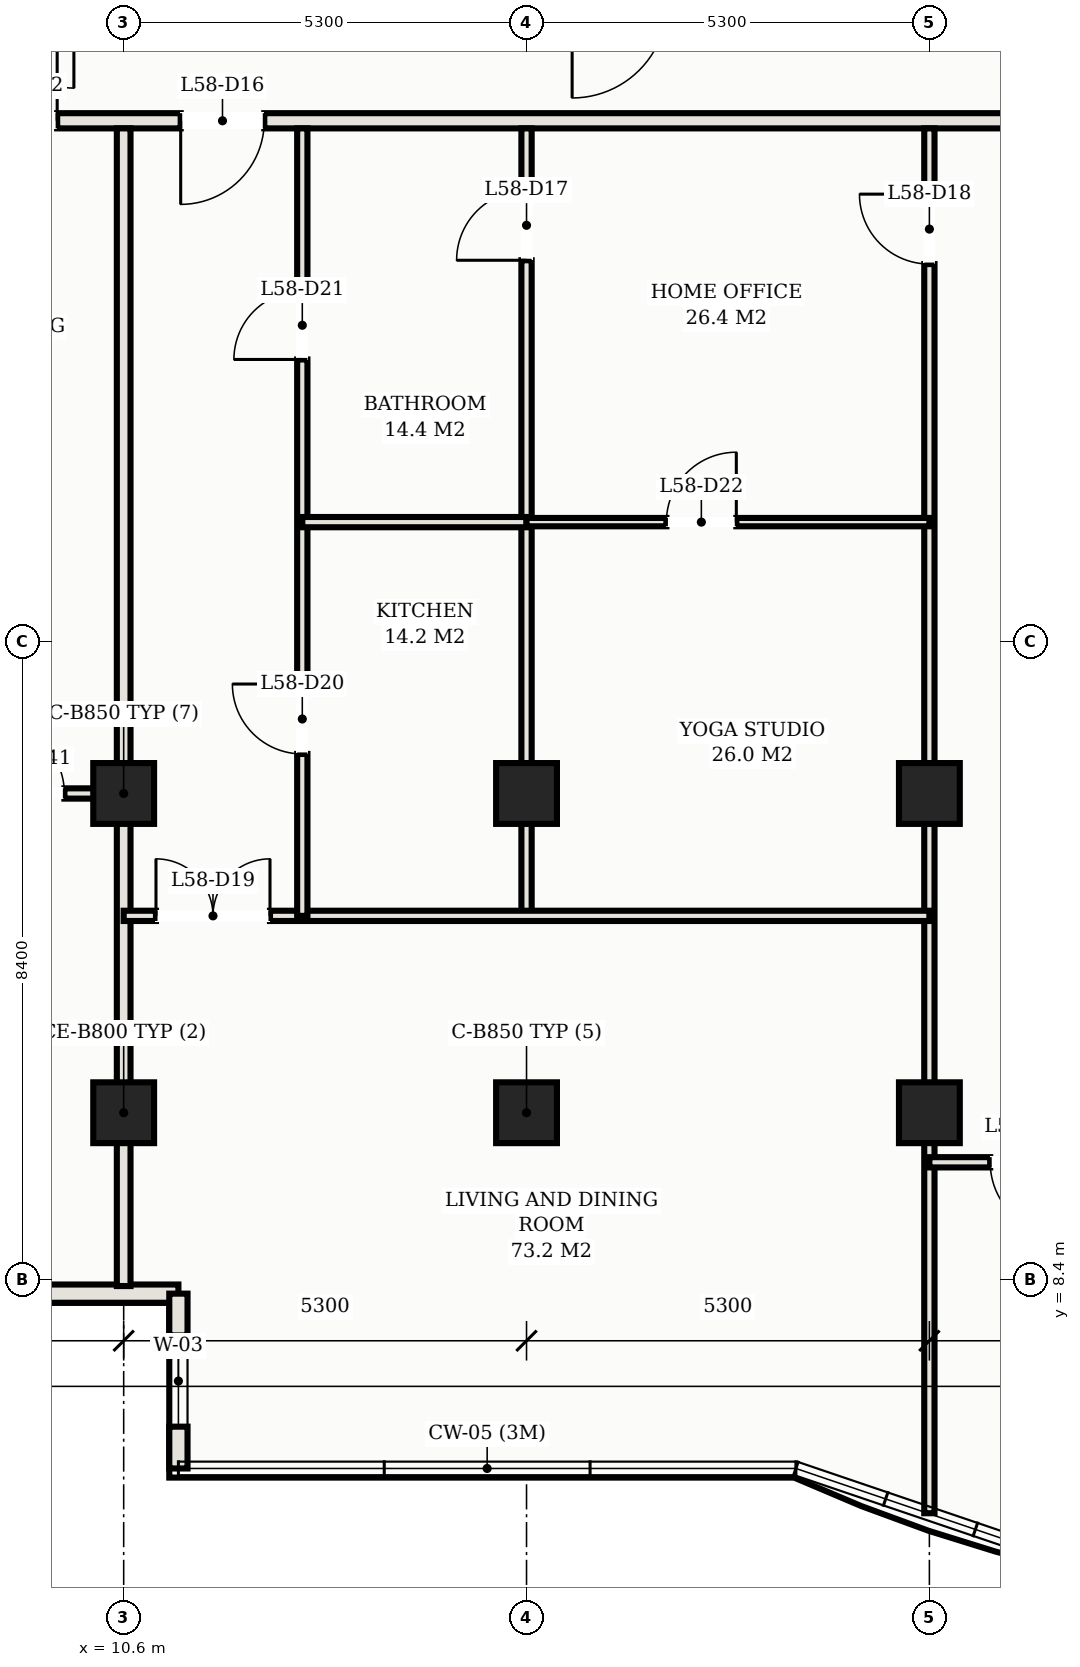
"""IFC4 building model, lengths in metres.
Left out: names, types, materials, properties, quantities, classifications, styles, units other than length and angle.
Written with IfcOpenShell. Run it as: python <this file> out.ifc"""

import sys

from ifc_helpers import new_model, si_unit, direction, frame, frame_2d, origin, origin_2d, place, context, subcontext, project, spatial, rectangle, hollow_rectangle, extrude, element, fill, save


model = new_model("IFC4")
c1 = context("Model", 3, precision=1e-05, world=origin(), true_north=direction((0.0, 1.0)))
c2 = subcontext(c1, "Body", "Model", "MODEL_VIEW")
j1 = project(units=[si_unit("LENGTHUNIT", "METRE"), si_unit("PLANEANGLEUNIT", "RADIAN")], contexts=[c1])
p1 = place(None, origin())
s1 = spatial("IfcSite", under=j1, at=p1, CompositionType="ELEMENT")
p2 = place(p1, origin())
s2 = spatial("IfcBuilding", under=s1, at=p2, CompositionType="ELEMENT")
p3 = place(p2, frame((0.0, 0.0, 213.2)))
s3 = spatial("IfcBuildingStorey", under=s2, at=p3, CompositionType="ELEMENT", Elevation=213.2)
for number, where, z_axis, x_axis in (
    (1, (10.6, 14.8, 0.0), (0.0, 0.0, 1.0), (1.0, 0.0, 0.0)),
    (2, (10.6, 10.6, 0.0), (0.0, 0.0, 1.0), (1.0, 0.0, 0.0)),
    (3, (15.9, 14.8, 0.0), (0.0, 0.0, 1.0), (1.0, 0.0, 0.0)),
    (4, (15.9, 10.6, 0.0), (0.0, 0.0, 1.0), (1.0, 0.0, 0.0)),
    (5, (21.2, 14.8, 0.0), (0.0, 0.0, 1.0), (1.0, 0.0, 0.0)),
    (6, (21.2, 10.6, 0.0), (0.0, 0.0, 1.0), (1.0, 0.0, 0.0)),
):
    element("IfcColumn", number, at=place(p3, frame(where, z_axis=z_axis, x_axis=x_axis)), inside=s3, PredefinedType="COLUMN", context=c2, shape_type="SweptSolid", body=[
        extrude(hollow_rectangle(XDim=0.8, YDim=0.8, WallThickness=0.028, at=origin_2d()), origin(), (0.0, 0.0, 1.0), 3.3),
    ])
p4 = place(p3, frame((9.02, 8.22, 0.0), z_axis=(0.0, 0.0, 1.0), x_axis=(1.0, 0.0, 0.0)))
e7 = element("IfcWall", 7, at=p4, inside=s3, PredefinedType="SOLIDWALL", context=c2, shape_type="SweptSolid", body=[
    extrude(rectangle(XDim=2.3, YDim=0.24, at=frame_2d((1.15, 0.0))), origin(), (0.0, 0.0, 1.0), 3.11),
])
p5 = place(p3, frame((11.32, 8.22, 0.0), z_axis=(0.0, 0.0, 1.0), x_axis=(0.0, -1.0, 0.0)))
e8 = element("IfcWall", 8, at=p5, inside=s3, PredefinedType="SOLIDWALL", context=c2, shape_type="SweptSolid", body=[
    extrude(rectangle(XDim=2.3, YDim=0.24, at=frame_2d((1.15, 0.0))), origin(), (0.0, 0.0, 1.0), 3.11),
])
p6 = place(p5, frame((0.55, 0.0, 0.75)))
e9 = element("IfcOpeningElement", 9, at=p6, cuts=e8, PredefinedType="OPENING", context=c2, shape_type="SweptSolid", body=[
    extrude(rectangle(XDim=1.2, YDim=1.5, at=frame_2d((0.6, 0.75))), frame((0.0, 0.13, 0.0), z_axis=(0.0, -1.0, 0.0), x_axis=(1.0, 0.0, 0.0)), (0.0, 0.0, 1.0), 0.26),
])
p7 = place(p3, frame((6.72, 23.65, 0.0), z_axis=(0.0, 0.0, 1.0), x_axis=(1.0, 0.0, 0.0)))
e10 = element("IfcWall", 10, at=p7, inside=s3, PredefinedType="PARTITIONING", context=c2, shape_type="SweptSolid", body=[
    extrude(rectangle(XDim=39.56, YDim=0.2, at=frame_2d((19.78, 0.0))), origin(), (0.0, 0.0, 1.0), 2.43),
])
p8 = place(p7, frame((4.63, 0.0, 0.0)))
e11 = element("IfcOpeningElement", 11, at=p8, cuts=e10, PredefinedType="OPENING", context=c2, shape_type="SweptSolid", body=[
    extrude(rectangle(XDim=1.1, YDim=2.25, at=frame_2d((0.55, 1.125))), frame((0.0, 0.11, 0.0), z_axis=(0.0, -1.0, 0.0), x_axis=(1.0, 0.0, 0.0)), (0.0, 0.0, 1.0), 0.22),
])
p9 = place(p7, frame((20.53, 0.0, 0.0)))
e12 = element("IfcOpeningElement", 12, at=p9, cuts=e10, PredefinedType="OPENING", context=c2, shape_type="SweptSolid", body=[
    extrude(rectangle(XDim=1.1, YDim=2.25, at=frame_2d((0.55, 1.125))), frame((0.0, 0.11, 0.0), z_axis=(0.0, -1.0, 0.0), x_axis=(1.0, 0.0, 0.0)), (0.0, 0.0, 1.0), 0.22),
])
p10 = place(p7, frame((2.085, 0.0, 0.0)))
e13 = element("IfcOpeningElement", 13, at=p10, cuts=e10, PredefinedType="OPENING", context=c2, shape_type="SweptSolid", body=[
    extrude(rectangle(XDim=0.92, YDim=2.15, at=frame_2d((0.46, 1.075))), frame((0.0, 0.11, 0.0), z_axis=(0.0, -1.0, 0.0), x_axis=(1.0, 0.0, 0.0)), (0.0, 0.0, 1.0), 0.22),
])
p11 = place(p7, frame((36.555, 0.0, 0.0)))
e14 = element("IfcOpeningElement", 14, at=p11, cuts=e10, PredefinedType="OPENING", context=c2, shape_type="SweptSolid", body=[
    extrude(rectangle(XDim=0.92, YDim=2.15, at=frame_2d((0.46, 1.075))), frame((0.0, 0.11, 0.0), z_axis=(0.0, -1.0, 0.0), x_axis=(1.0, 0.0, 0.0)), (0.0, 0.0, 1.0), 0.22),
])
p12 = place(p3, frame((10.6, 8.32, 0.0), z_axis=(0.0, 0.0, 1.0), x_axis=(0.0, 1.0, 0.0)))
e15 = element("IfcWall", 15, at=p12, inside=s3, PredefinedType="PARTITIONING", context=c2, shape_type="SweptSolid", body=[
    extrude(rectangle(XDim=15.23, YDim=0.18, at=frame_2d((7.615, 0.0))), origin(), (0.0, 0.0, 1.0), 2.43),
])
p13 = place(p3, frame((15.9, 14.8, 0.0), z_axis=(0.0, 0.0, 1.0), x_axis=(0.0, 1.0, 0.0)))
e16 = element("IfcWall", 16, at=p13, inside=s3, PredefinedType="PARTITIONING", context=c2, shape_type="SweptSolid", body=[
    extrude(rectangle(XDim=8.75, YDim=0.135, at=frame_2d((4.375, 0.0))), origin(), (0.0, 0.0, 1.0), 2.43),
])
p14 = place(p13, frame((7.015, 0.0, 0.0)))
e17 = element("IfcOpeningElement", 17, at=p14, cuts=e16, PredefinedType="OPENING", context=c2, shape_type="SweptSolid", body=[
    extrude(rectangle(XDim=0.92, YDim=2.15, at=frame_2d((0.46, 1.075))), frame((0.0, 0.078, 0.0), z_axis=(0.0, -1.0, 0.0), x_axis=(1.0, 0.0, 0.0)), (0.0, 0.0, 1.0), 0.155),
])
p15 = place(p3, frame((21.2, 5.331, 0.0), z_axis=(0.0, 0.0, 1.0), x_axis=(0.0, 1.0, 0.0)))
e18 = element("IfcWall", 18, at=p15, inside=s3, PredefinedType="PARTITIONING", context=c2, shape_type="SweptSolid", body=[
    extrude(rectangle(XDim=18.219, YDim=0.135, at=frame_2d((9.109, 0.0))), origin(), (0.0, 0.0, 1.0), 2.43),
])
p16 = place(p15, frame((16.434, 0.0, 0.0)))
e19 = element("IfcOpeningElement", 19, at=p16, cuts=e18, PredefinedType="OPENING", context=c2, shape_type="SweptSolid", body=[
    extrude(rectangle(XDim=0.92, YDim=2.15, at=frame_2d((0.46, 1.075))), frame((0.0, 0.078, 0.0), z_axis=(0.0, -1.0, 0.0), x_axis=(1.0, 0.0, 0.0)), (0.0, 0.0, 1.0), 0.155),
])
p17 = place(p3, frame((15.9, 13.19, 0.0), z_axis=(0.0, 0.0, 1.0), x_axis=(0.0, 1.0, 0.0)))
e20 = element("IfcWall", 20, at=p17, inside=s3, PredefinedType="PARTITIONING", context=c2, shape_type="SweptSolid", body=[
    extrude(rectangle(XDim=1.61, YDim=0.135, at=frame_2d((0.805, 0.0))), origin(), (0.0, 0.0, 1.0), 2.43),
])
p18 = place(p3, frame((10.6, 13.19, 0.0), z_axis=(0.0, 0.0, 1.0), x_axis=(1.0, 0.0, 0.0)))
e21 = element("IfcWall", 21, at=p18, inside=s3, PredefinedType="PARTITIONING", context=c2, shape_type="SweptSolid", body=[
    extrude(rectangle(XDim=10.6, YDim=0.135, at=frame_2d((5.3, 0.0))), origin(), (0.0, 0.0, 1.0), 2.43),
])
p19 = place(p18, frame((0.425, 0.0, 0.0)))
e22 = element("IfcOpeningElement", 22, at=p19, cuts=e21, PredefinedType="OPENING", context=c2, shape_type="SweptSolid", body=[
    extrude(rectangle(XDim=1.5, YDim=2.25, at=frame_2d((0.75, 1.125))), frame((0.0, 0.078, 0.0), z_axis=(0.0, -1.0, 0.0), x_axis=(1.0, 0.0, 0.0)), (0.0, 0.0, 1.0), 0.155),
])
p20 = place(p3, frame((12.95, 13.19, 0.0), z_axis=(0.0, 0.0, 1.0), x_axis=(0.0, 1.0, 0.0)))
e23 = element("IfcWall", 23, at=p20, inside=s3, PredefinedType="PARTITIONING", context=c2, shape_type="SweptSolid", body=[
    extrude(rectangle(XDim=10.36, YDim=0.135, at=frame_2d((5.18, 0.0))), origin(), (0.0, 0.0, 1.0), 2.43),
])
p21 = place(p20, frame((2.13, 0.0, 0.0)))
e24 = element("IfcOpeningElement", 24, at=p21, cuts=e23, PredefinedType="OPENING", context=c2, shape_type="SweptSolid", body=[
    extrude(rectangle(XDim=0.92, YDim=2.15, at=frame_2d((0.46, 1.075))), frame((0.0, 0.078, 0.0), z_axis=(0.0, -1.0, 0.0), x_axis=(1.0, 0.0, 0.0)), (0.0, 0.0, 1.0), 0.155),
])
p22 = place(p20, frame((7.32, 0.0, 0.0)))
e25 = element("IfcOpeningElement", 25, at=p22, cuts=e23, PredefinedType="OPENING", context=c2, shape_type="SweptSolid", body=[
    extrude(rectangle(XDim=0.9, YDim=2.15, at=frame_2d((0.45, 1.075))), frame((0.0, 0.078, 0.0), z_axis=(0.0, -1.0, 0.0), x_axis=(1.0, 0.0, 0.0)), (0.0, 0.0, 1.0), 0.155),
])
p23 = place(p3, frame((12.95, 18.37, 0.0), z_axis=(0.0, 0.0, 1.0), x_axis=(1.0, 0.0, 0.0)))
e26 = element("IfcWall", 26, at=p23, inside=s3, PredefinedType="PARTITIONING", context=c2, shape_type="SweptSolid", body=[
    extrude(rectangle(XDim=2.95, YDim=0.135, at=frame_2d((1.475, 0.0))), origin(), (0.0, 0.0, 1.0), 2.43),
])
p24 = place(p3, frame((15.9, 18.37, 0.0), z_axis=(0.0, 0.0, 1.0), x_axis=(1.0, 0.0, 0.0)))
e27 = element("IfcWall", 27, at=p24, inside=s3, PredefinedType="MOVABLE", context=c2, shape_type="SweptSolid", body=[
    extrude(rectangle(XDim=5.3, YDim=0.11, at=frame_2d((2.65, 0.0))), origin(), (0.0, 0.0, 1.0), 2.43),
])
p25 = place(p24, frame((1.84, 0.0, 0.0)))
e28 = element("IfcOpeningElement", 28, at=p25, cuts=e27, PredefinedType="OPENING", context=c2, shape_type="SweptSolid", body=[
    extrude(rectangle(XDim=0.92, YDim=2.15, at=frame_2d((0.46, 1.075))), frame((0.0, 0.065, 0.0), z_axis=(0.0, -1.0, 0.0), x_axis=(1.0, 0.0, 0.0)), (0.0, 0.0, 1.0), 0.13),
])
p26 = place(p3, frame((21.2, 9.948, 0.0), z_axis=(0.0, 0.0, 1.0), x_axis=(1.0, 0.0, 0.0)))
e29 = element("IfcWall", 29, at=p26, inside=s3, PredefinedType="PARTITIONING", context=c2, shape_type="SweptSolid", body=[
    extrude(rectangle(XDim=5.3, YDim=0.135, at=frame_2d((2.65, 0.0))), origin(), (0.0, 0.0, 1.0), 2.43),
])
p27 = place(p26, frame((0.8, 0.0, 0.0)))
e30 = element("IfcOpeningElement", 30, at=p27, cuts=e29, PredefinedType="OPENING", context=c2, shape_type="SweptSolid", body=[
    extrude(rectangle(XDim=0.95, YDim=2.15, at=frame_2d((0.475, 1.075))), frame((0.0, 0.078, 0.0), z_axis=(0.0, -1.0, 0.0), x_axis=(1.0, 0.0, 0.0)), (0.0, 0.0, 1.0), 0.155),
])
p28 = place(p26, frame((2.625, 0.0, 0.0)))
e31 = element("IfcOpeningElement", 31, at=p28, cuts=e29, PredefinedType="OPENING", context=c2, shape_type="SweptSolid", body=[
    extrude(rectangle(XDim=0.9, YDim=2.15, at=frame_2d((0.45, 1.075))), frame((0.0, 0.078, 0.0), z_axis=(0.0, -1.0, 0.0), x_axis=(1.0, 0.0, 0.0)), (0.0, 0.0, 1.0), 0.155),
])
p29 = place(p3, frame((6.82, 14.8, 0.0), z_axis=(0.0, 0.0, 1.0), x_axis=(1.0, 0.0, 0.0)))
e32 = element("IfcWall", 32, at=p29, inside=s3, PredefinedType="PARTITIONING", context=c2, shape_type="SweptSolid", body=[
    extrude(rectangle(XDim=3.78, YDim=0.135, at=frame_2d((1.89, 0.0))), origin(), (0.0, 0.0, 1.0), 2.43),
])
p30 = place(p29, frame((2.08, 0.0, 0.0)))
e33 = element("IfcOpeningElement", 33, at=p30, cuts=e32, PredefinedType="OPENING", context=c2, shape_type="SweptSolid", body=[
    extrude(rectangle(XDim=0.92, YDim=2.15, at=frame_2d((0.46, 1.075))), frame((0.0, 0.078, 0.0), z_axis=(0.0, -1.0, 0.0), x_axis=(1.0, 0.0, 0.0)), (0.0, 0.0, 1.0), 0.155),
])
p31 = place(p6, origin())
e34 = element("IfcWindow", 34, at=p31, inside=s3, PartitioningType="SINGLE_PANEL", PredefinedType="WINDOW", context=c2, shape_type="SweptSolid", body=[
    extrude(rectangle(XDim=1.2, YDim=1.5, at=frame_2d((0.6, 0.75))), frame((0.0, 0.03, 0.0), z_axis=(0.0, -1.0, 0.0), x_axis=(1.0, 0.0, 0.0)), (0.0, 0.0, 1.0), 0.06),
])
fill(e9, e34)
p32 = place(p8, frame((1.1, 0.0, 0.0), z_axis=(0.0, 0.0, 1.0), x_axis=(-1.0, 0.0, 0.0)))
e35 = element("IfcDoor", 35, at=p32, inside=s3, OperationType="SINGLE_SWING_RIGHT", PredefinedType="DOOR", context=c2, shape_type="SweptSolid", body=[
    extrude(rectangle(XDim=1.1, YDim=2.25, at=frame_2d((0.55, 1.125))), frame((0.0, 0.025, 0.0), z_axis=(0.0, -1.0, 0.0), x_axis=(1.0, 0.0, 0.0)), (0.0, 0.0, 1.0), 0.05),
])
fill(e11, e35)
p33 = place(p14, origin())
e36 = element("IfcDoor", 36, at=p33, inside=s3, OperationType="SINGLE_SWING_LEFT", PredefinedType="DOOR", context=c2, shape_type="SweptSolid", body=[
    extrude(rectangle(XDim=0.92, YDim=2.15, at=frame_2d((0.46, 1.075))), frame((0.0, 0.025, 0.0), z_axis=(0.0, -1.0, 0.0), x_axis=(1.0, 0.0, 0.0)), (0.0, 0.0, 1.0), 0.05),
])
fill(e17, e36)
p34 = place(p16, origin())
e37 = element("IfcDoor", 37, at=p34, inside=s3, OperationType="SINGLE_SWING_RIGHT", PredefinedType="DOOR", context=c2, shape_type="SweptSolid", body=[
    extrude(rectangle(XDim=0.92, YDim=2.15, at=frame_2d((0.46, 1.075))), frame((0.0, 0.025, 0.0), z_axis=(0.0, -1.0, 0.0), x_axis=(1.0, 0.0, 0.0)), (0.0, 0.0, 1.0), 0.05),
])
fill(e19, e37)
p35 = place(p19, origin())
e38 = element("IfcDoor", 38, at=p35, inside=s3, OperationType="DOUBLE_DOOR_SINGLE_SWING", PredefinedType="DOOR", context=c2, shape_type="SweptSolid", body=[
    extrude(rectangle(XDim=1.5, YDim=2.25, at=frame_2d((0.75, 1.125))), frame((0.0, 0.025, 0.0), z_axis=(0.0, -1.0, 0.0), x_axis=(1.0, 0.0, 0.0)), (0.0, 0.0, 1.0), 0.05),
])
fill(e22, e38)
p36 = place(p21, origin())
e39 = element("IfcDoor", 39, at=p36, inside=s3, OperationType="SINGLE_SWING_RIGHT", PredefinedType="DOOR", context=c2, shape_type="SweptSolid", body=[
    extrude(rectangle(XDim=0.92, YDim=2.15, at=frame_2d((0.46, 1.075))), frame((0.0, 0.025, 0.0), z_axis=(0.0, -1.0, 0.0), x_axis=(1.0, 0.0, 0.0)), (0.0, 0.0, 1.0), 0.05),
])
fill(e24, e39)
p37 = place(p22, origin())
e40 = element("IfcDoor", 40, at=p37, inside=s3, OperationType="SINGLE_SWING_LEFT", PredefinedType="DOOR", context=c2, shape_type="SweptSolid", body=[
    extrude(rectangle(XDim=0.9, YDim=2.15, at=frame_2d((0.45, 1.075))), frame((0.0, 0.025, 0.0), z_axis=(0.0, -1.0, 0.0), x_axis=(1.0, 0.0, 0.0)), (0.0, 0.0, 1.0), 0.05),
])
fill(e25, e40)
p38 = place(p25, origin())
e41 = element("IfcDoor", 41, at=p38, inside=s3, OperationType="SINGLE_SWING_RIGHT", PredefinedType="DOOR", context=c2, shape_type="SweptSolid", body=[
    extrude(rectangle(XDim=0.92, YDim=2.15, at=frame_2d((0.46, 1.075))), frame((0.0, 0.025, 0.0), z_axis=(0.0, -1.0, 0.0), x_axis=(1.0, 0.0, 0.0)), (0.0, 0.0, 1.0), 0.05),
])
fill(e28, e41)
p39 = place(p27, frame((0.95, 0.0, 0.0), z_axis=(0.0, 0.0, 1.0), x_axis=(-1.0, 0.0, 0.0)))
e42 = element("IfcDoor", 42, at=p39, inside=s3, OperationType="SINGLE_SWING_LEFT", PredefinedType="DOOR", context=c2, shape_type="SweptSolid", body=[
    extrude(rectangle(XDim=0.95, YDim=2.15, at=frame_2d((0.475, 1.075))), frame((0.0, 0.025, 0.0), z_axis=(0.0, -1.0, 0.0), x_axis=(1.0, 0.0, 0.0)), (0.0, 0.0, 1.0), 0.05),
])
fill(e30, e42)
p40 = place(p30, origin())
e43 = element("IfcDoor", 43, at=p40, inside=s3, OperationType="SINGLE_SWING_LEFT", PredefinedType="DOOR", context=c2, shape_type="SweptSolid", body=[
    extrude(rectangle(XDim=0.92, YDim=2.15, at=frame_2d((0.46, 1.075))), frame((0.0, 0.025, 0.0), z_axis=(0.0, -1.0, 0.0), x_axis=(1.0, 0.0, 0.0)), (0.0, 0.0, 1.0), 0.05),
])
fill(e33, e43)
p41 = place(p10, origin())
e44 = element("IfcDoor", 44, at=p41, inside=s3, OperationType="SINGLE_SWING_RIGHT", PredefinedType="DOOR", context=c2, shape_type="SweptSolid", body=[
    extrude(rectangle(XDim=0.92, YDim=2.15, at=frame_2d((0.46, 1.075))), frame((0.0, 0.025, 0.0), z_axis=(0.0, -1.0, 0.0), x_axis=(1.0, 0.0, 0.0)), (0.0, 0.0, 1.0), 0.05),
])
fill(e13, e44)
save(model, sys.argv[1])
